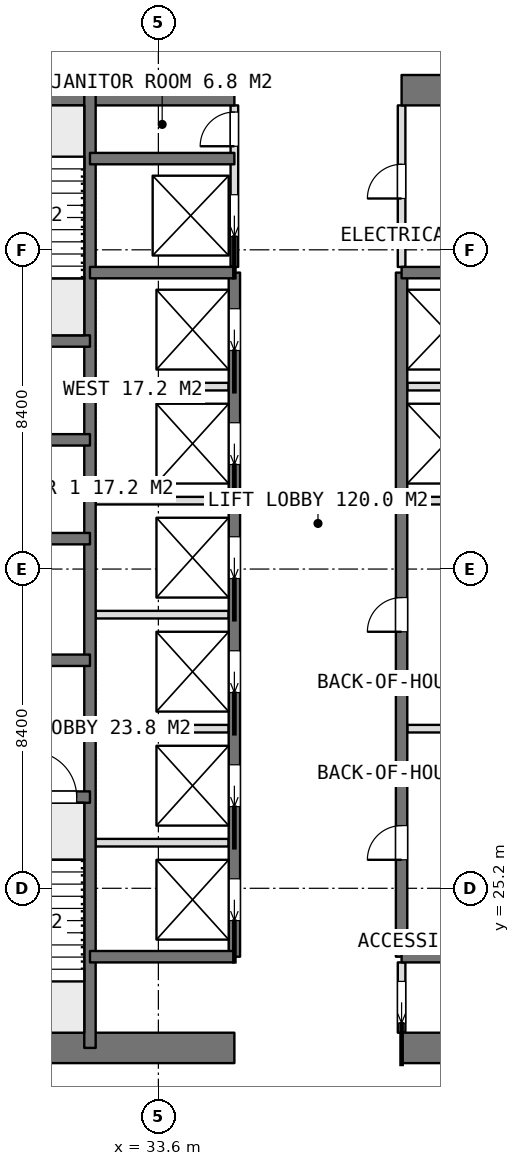
"""IFC4 building model, lengths in metres.
Left out: names, types, materials, properties, quantities, classifications, styles, units other than length and angle.
Written with IfcOpenShell. Run it as: python <this file> out.ifc"""

import sys

from ifc_helpers import new_model, si_unit, direction, frame, frame_2d, origin, place, context, subcontext, project, spatial, rectangle, extrude, element, fill, save


model = new_model("IFC4")
c1 = context("Model", 3, precision=1e-05, world=origin(), true_north=direction((0.0, 1.0)))
c2 = subcontext(c1, "Body", "Model", "MODEL_VIEW")
j1 = project(units=[si_unit("LENGTHUNIT", "METRE"), si_unit("PLANEANGLEUNIT", "RADIAN")], contexts=[c1])
p1 = place(None, origin())
s1 = spatial("IfcSite", under=j1, at=p1, CompositionType="ELEMENT")
p2 = place(p1, origin())
s2 = spatial("IfcBuilding", under=s1, at=p2, CompositionType="ELEMENT")
p3 = place(p2, frame((0.0, 0.0, 287.6)))
s3 = spatial("IfcBuildingStorey", under=s2, at=p3, CompositionType="ELEMENT", Elevation=287.6)
p4 = place(p3, frame((25.2, 21.0, 0.0), z_axis=(0.0, 0.0, 1.0), x_axis=(1.0, 0.0, 0.0)))
e1 = element("IfcWall", 1, at=p4, inside=s3, PredefinedType="SHEAR", context=c2, shape_type="SweptSolid", body=[
    extrude(rectangle(XDim=10.4, YDim=0.8, at=frame_2d((5.2, 0.0))), origin(), (0.0, 0.0, 1.0), 3.75),
])
p5 = place(p3, frame((40.0, 21.0, 0.0), z_axis=(0.0, 0.0, 1.0), x_axis=(1.0, 0.0, 0.0)))
e2 = element("IfcWall", 2, at=p5, inside=s3, PredefinedType="SHEAR", context=c2, shape_type="SweptSolid", body=[
    extrude(rectangle(XDim=10.4, YDim=0.8, at=frame_2d((5.2, 0.0))), origin(), (0.0, 0.0, 1.0), 3.75),
])
p6 = place(p3, frame((25.2, 46.2, 0.0), z_axis=(0.0, 0.0, 1.0), x_axis=(1.0, 0.0, 0.0)))
e3 = element("IfcWall", 3, at=p6, inside=s3, PredefinedType="SHEAR", context=c2, shape_type="SweptSolid", body=[
    extrude(rectangle(XDim=10.4, YDim=0.8, at=frame_2d((5.2, 0.0))), origin(), (0.0, 0.0, 1.0), 3.75),
])
p7 = place(p3, frame((40.0, 46.2, 0.0), z_axis=(0.0, 0.0, 1.0), x_axis=(1.0, 0.0, 0.0)))
e4 = element("IfcWall", 4, at=p7, inside=s3, PredefinedType="SHEAR", context=c2, shape_type="SweptSolid", body=[
    extrude(rectangle(XDim=10.4, YDim=0.8, at=frame_2d((5.2, 0.0))), origin(), (0.0, 0.0, 1.0), 3.75),
])
p8 = place(p3, frame((31.8, 21.0, 0.0), z_axis=(0.0, 0.0, 1.0), x_axis=(0.0, 1.0, 0.0)))
e5 = element("IfcWall", 5, at=p8, inside=s3, PredefinedType="SHEAR", context=c2, shape_type="SweptSolid", body=[
    extrude(rectangle(XDim=25.2, YDim=0.3, at=frame_2d((12.6, 0.0))), origin(), (0.0, 0.0, 1.0), 3.75),
])
p9 = place(p3, frame((35.6, 23.4, 0.0), z_axis=(0.0, 0.0, 1.0), x_axis=(0.0, 1.0, 0.0)))
e6 = element("IfcWall", 6, at=p9, inside=s3, PredefinedType="SHEAR", context=c2, shape_type="SweptSolid", body=[
    extrude(rectangle(XDim=18.0, YDim=0.3, at=frame_2d((9.0, 0.0))), origin(), (0.0, 0.0, 1.0), 3.75),
])
p10 = place(p9, frame((0.95, 0.0, 0.0)))
e7 = element("IfcOpeningElement", 7, at=p10, cuts=e6, PredefinedType="OPENING", context=c2, shape_type="SweptSolid", body=[
    extrude(rectangle(XDim=1.1, YDim=2.1, at=frame_2d((0.55, 1.05))), frame((0.0, 0.16, 0.0), z_axis=(0.0, -1.0, 0.0), x_axis=(1.0, 0.0, 0.0)), (0.0, 0.0, 1.0), 0.32),
])
p11 = place(p9, frame((3.95, 0.0, 0.0)))
e8 = element("IfcOpeningElement", 8, at=p11, cuts=e6, PredefinedType="OPENING", context=c2, shape_type="SweptSolid", body=[
    extrude(rectangle(XDim=1.1, YDim=2.1, at=frame_2d((0.55, 1.05))), frame((0.0, 0.16, 0.0), z_axis=(0.0, -1.0, 0.0), x_axis=(1.0, 0.0, 0.0)), (0.0, 0.0, 1.0), 0.32),
])
p12 = place(p9, frame((6.95, 0.0, 0.0)))
e9 = element("IfcOpeningElement", 9, at=p12, cuts=e6, PredefinedType="OPENING", context=c2, shape_type="SweptSolid", body=[
    extrude(rectangle(XDim=1.1, YDim=2.1, at=frame_2d((0.55, 1.05))), frame((0.0, 0.16, 0.0), z_axis=(0.0, -1.0, 0.0), x_axis=(1.0, 0.0, 0.0)), (0.0, 0.0, 1.0), 0.32),
])
p13 = place(p9, frame((9.95, 0.0, 0.0)))
e10 = element("IfcOpeningElement", 10, at=p13, cuts=e6, PredefinedType="OPENING", context=c2, shape_type="SweptSolid", body=[
    extrude(rectangle(XDim=1.1, YDim=2.1, at=frame_2d((0.55, 1.05))), frame((0.0, 0.16, 0.0), z_axis=(0.0, -1.0, 0.0), x_axis=(1.0, 0.0, 0.0)), (0.0, 0.0, 1.0), 0.32),
])
p14 = place(p9, frame((12.95, 0.0, 0.0)))
e11 = element("IfcOpeningElement", 11, at=p14, cuts=e6, PredefinedType="OPENING", context=c2, shape_type="SweptSolid", body=[
    extrude(rectangle(XDim=1.1, YDim=2.1, at=frame_2d((0.55, 1.05))), frame((0.0, 0.16, 0.0), z_axis=(0.0, -1.0, 0.0), x_axis=(1.0, 0.0, 0.0)), (0.0, 0.0, 1.0), 0.32),
])
p15 = place(p9, frame((15.95, 0.0, 0.0)))
e12 = element("IfcOpeningElement", 12, at=p15, cuts=e6, PredefinedType="OPENING", context=c2, shape_type="SweptSolid", body=[
    extrude(rectangle(XDim=1.1, YDim=2.1, at=frame_2d((0.55, 1.05))), frame((0.0, 0.16, 0.0), z_axis=(0.0, -1.0, 0.0), x_axis=(1.0, 0.0, 0.0)), (0.0, 0.0, 1.0), 0.32),
])
p16 = place(p3, frame((40.0, 23.4, 0.0), z_axis=(0.0, 0.0, 1.0), x_axis=(0.0, 1.0, 0.0)))
e13 = element("IfcWall", 13, at=p16, inside=s3, PredefinedType="SHEAR", context=c2, shape_type="SweptSolid", body=[
    extrude(rectangle(XDim=18.0, YDim=0.3, at=frame_2d((9.0, 0.0))), origin(), (0.0, 0.0, 1.0), 3.75),
])
p17 = place(p16, frame((2.55, 0.0, 0.0)))
e14 = element("IfcOpeningElement", 14, at=p17, cuts=e13, PredefinedType="OPENING", context=c2, shape_type="SweptSolid", body=[
    extrude(rectangle(XDim=0.9, YDim=2.1, at=frame_2d((0.45, 1.05))), frame((0.0, 0.16, 0.0), z_axis=(0.0, -1.0, 0.0), x_axis=(1.0, 0.0, 0.0)), (0.0, 0.0, 1.0), 0.32),
])
p18 = place(p16, frame((8.55, 0.0, 0.0)))
e15 = element("IfcOpeningElement", 15, at=p18, cuts=e13, PredefinedType="OPENING", context=c2, shape_type="SweptSolid", body=[
    extrude(rectangle(XDim=0.9, YDim=2.1, at=frame_2d((0.45, 1.05))), frame((0.0, 0.16, 0.0), z_axis=(0.0, -1.0, 0.0), x_axis=(1.0, 0.0, 0.0)), (0.0, 0.0, 1.0), 0.32),
])
for number, where, z_axis, x_axis in (
    (16, (31.8, 23.4, 0.0), (0.0, 0.0, 1.0), (1.0, 0.0, 0.0)),
    (17, (31.8, 41.4, 0.0), (0.0, 0.0, 1.0), (1.0, 0.0, 0.0)),
    (18, (31.8, 44.4, 0.0), (0.0, 0.0, 1.0), (1.0, 0.0, 0.0)),
    (19, (40.0, 23.4, 0.0), (0.0, 0.0, 1.0), (1.0, 0.0, 0.0)),
    (20, (40.0, 41.4, 0.0), (0.0, 0.0, 1.0), (1.0, 0.0, 0.0)),
):
    element("IfcWall", number, at=place(p3, frame(where, z_axis=z_axis, x_axis=x_axis)), inside=s3, PredefinedType="SHEAR", context=c2, shape_type="SweptSolid", body=[
        extrude(rectangle(XDim=3.8, YDim=0.3, at=frame_2d((1.9, 0.0))), origin(), (0.0, 0.0, 1.0), 3.75),
    ])
p19 = place(p3, frame((25.2, 27.6, 0.0), z_axis=(0.0, 0.0, 1.0), x_axis=(1.0, 0.0, 0.0)))
e21 = element("IfcWall", 21, at=p19, inside=s3, PredefinedType="SHEAR", context=c2, shape_type="SweptSolid", body=[
    extrude(rectangle(XDim=6.6, YDim=0.3, at=frame_2d((3.3, 0.0))), origin(), (0.0, 0.0, 1.0), 3.75),
])
p20 = place(p19, frame((5.05, 0.0, 0.0)))
e22 = element("IfcOpeningElement", 22, at=p20, cuts=e21, PredefinedType="OPENING", context=c2, shape_type="SweptSolid", body=[
    extrude(rectangle(XDim=1.2, YDim=2.1, at=frame_2d((0.6, 1.05))), frame((0.0, 0.16, 0.0), z_axis=(0.0, -1.0, 0.0), x_axis=(1.0, 0.0, 0.0)), (0.0, 0.0, 1.0), 0.32),
])
p21 = place(p3, frame((25.2, 31.2, 0.0), z_axis=(0.0, 0.0, 1.0), x_axis=(1.0, 0.0, 0.0)))
e23 = element("IfcWall", 23, at=p21, inside=s3, PredefinedType="SHEAR", context=c2, shape_type="SweptSolid", body=[
    extrude(rectangle(XDim=6.6, YDim=0.3, at=frame_2d((3.3, 0.0))), origin(), (0.0, 0.0, 1.0), 3.75),
])
p22 = place(p21, frame((2.65, 0.0, 0.0)))
e24 = element("IfcOpeningElement", 24, at=p22, cuts=e23, PredefinedType="OPENING", context=c2, shape_type="SweptSolid", body=[
    extrude(rectangle(XDim=1.3, YDim=2.1, at=frame_2d((0.65, 1.05))), frame((0.0, 0.16, 0.0), z_axis=(0.0, -1.0, 0.0), x_axis=(1.0, 0.0, 0.0)), (0.0, 0.0, 1.0), 0.32),
])
for number, where, z_axis, x_axis in (
    (25, (25.2, 34.4, 0.0), (0.0, 0.0, 1.0), (1.0, 0.0, 0.0)),
    (26, (25.2, 37.0, 0.0), (0.0, 0.0, 1.0), (1.0, 0.0, 0.0)),
    (27, (25.2, 39.6, 0.0), (0.0, 0.0, 1.0), (1.0, 0.0, 0.0)),
):
    element("IfcWall", number, at=place(p3, frame(where, z_axis=z_axis, x_axis=x_axis)), inside=s3, PredefinedType="SHEAR", context=c2, shape_type="SweptSolid", body=[
        extrude(rectangle(XDim=6.6, YDim=0.3, at=frame_2d((3.3, 0.0))), origin(), (0.0, 0.0, 1.0), 3.75),
    ])
for number, where, z_axis, x_axis in (
    (28, (31.95, 26.4, 0.0), (0.0, 0.0, 1.0), (1.0, 0.0, 0.0)),
    (29, (31.95, 29.4, 0.0), (0.0, 0.0, 1.0), (1.0, 0.0, 0.0)),
    (30, (31.95, 32.4, 0.0), (0.0, 0.0, 1.0), (1.0, 0.0, 0.0)),
    (31, (31.95, 35.4, 0.0), (0.0, 0.0, 1.0), (1.0, 0.0, 0.0)),
    (32, (31.95, 38.4, 0.0), (0.0, 0.0, 1.0), (1.0, 0.0, 0.0)),
    (33, (40.15, 29.4, 0.0), (0.0, 0.0, 1.0), (1.0, 0.0, 0.0)),
    (34, (40.15, 35.4, 0.0), (0.0, 0.0, 1.0), (1.0, 0.0, 0.0)),
    (35, (40.15, 38.4, 0.0), (0.0, 0.0, 1.0), (1.0, 0.0, 0.0)),
):
    element("IfcWall", number, at=place(p3, frame(where, z_axis=z_axis, x_axis=x_axis)), inside=s3, PredefinedType="PARTITIONING", context=c2, shape_type="SweptSolid", body=[
        extrude(rectangle(XDim=3.5, YDim=0.2, at=frame_2d((1.75, 0.0))), origin(), (0.0, 0.0, 1.0), 3.45),
    ])
p23 = place(p3, frame((40.0, 21.4, 0.0), z_axis=(0.0, 0.0, 1.0), x_axis=(0.0, 1.0, 0.0)))
e36 = element("IfcWall", 36, at=p23, inside=s3, PredefinedType="PARTITIONING", context=c2, shape_type="SweptSolid", body=[
    extrude(rectangle(XDim=1.85, YDim=0.2, at=frame_2d((0.925, 0.0))), origin(), (0.0, 0.0, 1.0), 3.45),
])
p24 = place(p23, frame((0.25, 0.0, 0.0)))
e37 = element("IfcOpeningElement", 37, at=p24, cuts=e36, PredefinedType="OPENING", context=c2, shape_type="SweptSolid", body=[
    extrude(rectangle(XDim=1.1, YDim=2.1, at=frame_2d((0.55, 1.05))), frame((0.0, 0.11, 0.0), z_axis=(0.0, -1.0, 0.0), x_axis=(1.0, 0.0, 0.0)), (0.0, 0.0, 1.0), 0.22),
])
p25 = place(p3, frame((40.0, 41.55, 0.0), z_axis=(0.0, 0.0, 1.0), x_axis=(0.0, 1.0, 0.0)))
e38 = element("IfcWall", 38, at=p25, inside=s3, PredefinedType="PARTITIONING", context=c2, shape_type="SweptSolid", body=[
    extrude(rectangle(XDim=4.25, YDim=0.2, at=frame_2d((2.125, 0.0))), origin(), (0.0, 0.0, 1.0), 3.45),
])
p26 = place(p25, frame((1.8, 0.0, 0.0)))
e39 = element("IfcOpeningElement", 39, at=p26, cuts=e38, PredefinedType="OPENING", context=c2, shape_type="SweptSolid", body=[
    extrude(rectangle(XDim=0.9, YDim=2.1, at=frame_2d((0.45, 1.05))), frame((0.0, 0.11, 0.0), z_axis=(0.0, -1.0, 0.0), x_axis=(1.0, 0.0, 0.0)), (0.0, 0.0, 1.0), 0.22),
])
p27 = place(p3, frame((35.6, 41.55, 0.0), z_axis=(0.0, 0.0, 1.0), x_axis=(0.0, 1.0, 0.0)))
e40 = element("IfcWall", 40, at=p27, inside=s3, PredefinedType="PARTITIONING", context=c2, shape_type="SweptSolid", body=[
    extrude(rectangle(XDim=4.25, YDim=0.2, at=frame_2d((2.125, 0.0))), origin(), (0.0, 0.0, 1.0), 3.45),
])
p28 = place(p27, frame((3.175, 0.0, 0.0)))
e41 = element("IfcOpeningElement", 41, at=p28, cuts=e40, PredefinedType="OPENING", context=c2, shape_type="SweptSolid", body=[
    extrude(rectangle(XDim=0.9, YDim=2.1, at=frame_2d((0.45, 1.05))), frame((0.0, 0.11, 0.0), z_axis=(0.0, -1.0, 0.0), x_axis=(1.0, 0.0, 0.0)), (0.0, 0.0, 1.0), 0.22),
])
p29 = place(p27, frame((0.8, 0.0, 0.0)))
e42 = element("IfcOpeningElement", 42, at=p29, cuts=e40, PredefinedType="OPENING", context=c2, shape_type="SweptSolid", body=[
    extrude(rectangle(XDim=1.1, YDim=2.1, at=frame_2d((0.55, 1.05))), frame((0.0, 0.11, 0.0), z_axis=(0.0, -1.0, 0.0), x_axis=(1.0, 0.0, 0.0)), (0.0, 0.0, 1.0), 0.22),
])
p30 = place(p24, origin())
e43 = element("IfcDoor", 43, at=p30, inside=s3, OperationType="SLIDING_TO_LEFT", PredefinedType="DOOR", context=c2, shape_type="SweptSolid", body=[
    extrude(rectangle(XDim=1.1, YDim=2.1, at=frame_2d((0.55, 1.05))), frame((0.0, 0.025, 0.0), z_axis=(0.0, -1.0, 0.0), x_axis=(1.0, 0.0, 0.0)), (0.0, 0.0, 1.0), 0.05),
])
fill(e37, e43)
p31 = place(p26, origin())
e44 = element("IfcDoor", 44, at=p31, inside=s3, OperationType="SINGLE_SWING_LEFT", PredefinedType="DOOR", context=c2, shape_type="SweptSolid", body=[
    extrude(rectangle(XDim=0.9, YDim=2.1, at=frame_2d((0.45, 1.05))), frame((0.0, 0.025, 0.0), z_axis=(0.0, -1.0, 0.0), x_axis=(1.0, 0.0, 0.0)), (0.0, 0.0, 1.0), 0.05),
])
fill(e39, e44)
p32 = place(p17, origin())
e45 = element("IfcDoor", 45, at=p32, inside=s3, OperationType="SINGLE_SWING_LEFT", PredefinedType="DOOR", context=c2, shape_type="SweptSolid", body=[
    extrude(rectangle(XDim=0.9, YDim=2.1, at=frame_2d((0.45, 1.05))), frame((0.0, 0.025, 0.0), z_axis=(0.0, -1.0, 0.0), x_axis=(1.0, 0.0, 0.0)), (0.0, 0.0, 1.0), 0.05),
])
fill(e14, e45)
p33 = place(p18, origin())
e46 = element("IfcDoor", 46, at=p33, inside=s3, OperationType="SINGLE_SWING_LEFT", PredefinedType="DOOR", context=c2, shape_type="SweptSolid", body=[
    extrude(rectangle(XDim=0.9, YDim=2.1, at=frame_2d((0.45, 1.05))), frame((0.0, 0.025, 0.0), z_axis=(0.0, -1.0, 0.0), x_axis=(1.0, 0.0, 0.0)), (0.0, 0.0, 1.0), 0.05),
])
fill(e15, e46)
p34 = place(p28, origin())
e47 = element("IfcDoor", 47, at=p34, inside=s3, OperationType="SINGLE_SWING_LEFT", PredefinedType="DOOR", context=c2, shape_type="SweptSolid", body=[
    extrude(rectangle(XDim=0.9, YDim=2.1, at=frame_2d((0.45, 1.05))), frame((0.0, 0.025, 0.0), z_axis=(0.0, -1.0, 0.0), x_axis=(1.0, 0.0, 0.0)), (0.0, 0.0, 1.0), 0.05),
])
fill(e41, e47)
p35 = place(p10, origin())
e48 = element("IfcDoor", 48, at=p35, inside=s3, OperationType="SLIDING_TO_LEFT", PredefinedType="USERDEFINED", context=c2, shape_type="SweptSolid", body=[
    extrude(rectangle(XDim=1.1, YDim=2.1, at=frame_2d((0.55, 1.05))), frame((0.0, 0.025, 0.0), z_axis=(0.0, -1.0, 0.0), x_axis=(1.0, 0.0, 0.0)), (0.0, 0.0, 1.0), 0.05),
])
fill(e7, e48)
p36 = place(p11, origin())
e49 = element("IfcDoor", 49, at=p36, inside=s3, OperationType="SLIDING_TO_LEFT", PredefinedType="USERDEFINED", context=c2, shape_type="SweptSolid", body=[
    extrude(rectangle(XDim=1.1, YDim=2.1, at=frame_2d((0.55, 1.05))), frame((0.0, 0.025, 0.0), z_axis=(0.0, -1.0, 0.0), x_axis=(1.0, 0.0, 0.0)), (0.0, 0.0, 1.0), 0.05),
])
fill(e8, e49)
p37 = place(p12, origin())
e50 = element("IfcDoor", 50, at=p37, inside=s3, OperationType="SLIDING_TO_LEFT", PredefinedType="USERDEFINED", context=c2, shape_type="SweptSolid", body=[
    extrude(rectangle(XDim=1.1, YDim=2.1, at=frame_2d((0.55, 1.05))), frame((0.0, 0.025, 0.0), z_axis=(0.0, -1.0, 0.0), x_axis=(1.0, 0.0, 0.0)), (0.0, 0.0, 1.0), 0.05),
])
fill(e9, e50)
p38 = place(p13, origin())
e51 = element("IfcDoor", 51, at=p38, inside=s3, OperationType="SLIDING_TO_LEFT", PredefinedType="USERDEFINED", context=c2, shape_type="SweptSolid", body=[
    extrude(rectangle(XDim=1.1, YDim=2.1, at=frame_2d((0.55, 1.05))), frame((0.0, 0.025, 0.0), z_axis=(0.0, -1.0, 0.0), x_axis=(1.0, 0.0, 0.0)), (0.0, 0.0, 1.0), 0.05),
])
fill(e10, e51)
p39 = place(p14, origin())
e52 = element("IfcDoor", 52, at=p39, inside=s3, OperationType="SLIDING_TO_LEFT", PredefinedType="USERDEFINED", context=c2, shape_type="SweptSolid", body=[
    extrude(rectangle(XDim=1.1, YDim=2.1, at=frame_2d((0.55, 1.05))), frame((0.0, 0.025, 0.0), z_axis=(0.0, -1.0, 0.0), x_axis=(1.0, 0.0, 0.0)), (0.0, 0.0, 1.0), 0.05),
])
fill(e11, e52)
p40 = place(p15, origin())
e53 = element("IfcDoor", 53, at=p40, inside=s3, OperationType="SLIDING_TO_LEFT", PredefinedType="USERDEFINED", context=c2, shape_type="SweptSolid", body=[
    extrude(rectangle(XDim=1.1, YDim=2.1, at=frame_2d((0.55, 1.05))), frame((0.0, 0.025, 0.0), z_axis=(0.0, -1.0, 0.0), x_axis=(1.0, 0.0, 0.0)), (0.0, 0.0, 1.0), 0.05),
])
fill(e12, e53)
p41 = place(p29, origin())
e54 = element("IfcDoor", 54, at=p41, inside=s3, OperationType="SLIDING_TO_LEFT", PredefinedType="USERDEFINED", context=c2, shape_type="SweptSolid", body=[
    extrude(rectangle(XDim=1.1, YDim=2.1, at=frame_2d((0.55, 1.05))), frame((0.0, 0.025, 0.0), z_axis=(0.0, -1.0, 0.0), x_axis=(1.0, 0.0, 0.0)), (0.0, 0.0, 1.0), 0.05),
])
fill(e42, e54)
p42 = place(p20, origin())
e55 = element("IfcDoor", 55, at=p42, inside=s3, OperationType="SINGLE_SWING_RIGHT", PredefinedType="DOOR", context=c2, shape_type="SweptSolid", body=[
    extrude(rectangle(XDim=1.2, YDim=2.1, at=frame_2d((0.6, 1.05))), frame((0.0, 0.025, 0.0), z_axis=(0.0, -1.0, 0.0), x_axis=(1.0, 0.0, 0.0)), (0.0, 0.0, 1.0), 0.05),
])
fill(e22, e55)
save(model, sys.argv[1])
